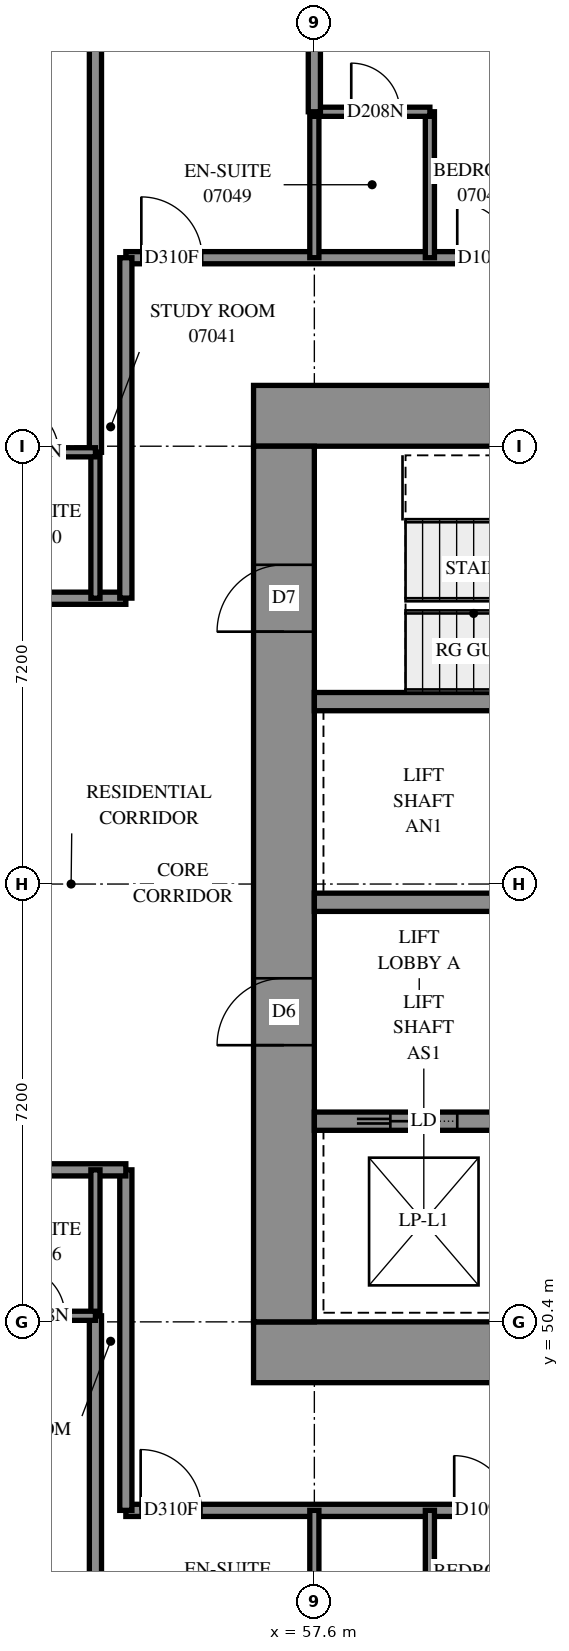
"""IFC4 building model, lengths in metres.
Left out: names, types, materials, properties, quantities, classifications, styles, units other than length and angle.
Written with IfcOpenShell. Run it as: python <this file> out.ifc"""

import sys

from ifc_helpers import new_model, si_unit, direction, frame, frame_2d, origin, place, context, subcontext, project, spatial, rectangle, extrude, element, fill, save


model = new_model("IFC4")
c1 = context("Model", 3, precision=1e-05, world=origin(), true_north=direction((0.0, 1.0)))
c2 = subcontext(c1, "Body", "Model", "MODEL_VIEW")
j1 = project(units=[si_unit("LENGTHUNIT", "METRE"), si_unit("PLANEANGLEUNIT", "RADIAN")], contexts=[c1])
p1 = place(None, origin())
s1 = spatial("IfcSite", under=j1, at=p1, CompositionType="ELEMENT")
p2 = place(p1, origin())
s2 = spatial("IfcBuilding", under=s1, at=p2, CompositionType="ELEMENT")
p3 = place(p2, frame((0.0, 0.0, 30.4)))
s3 = spatial("IfcBuildingStorey", under=s2, at=p3, CompositionType="ELEMENT", Elevation=30.4)
p4 = place(p3, frame((56.6, 49.9, -0.3), z_axis=(0.0, 0.0, 1.0), x_axis=(1.0, 0.0, 0.0)))
e1 = element("IfcWall", 1, at=p4, inside=s3, PredefinedType="SHEAR", context=c2, shape_type="SweptSolid", body=[
    extrude(rectangle(XDim=16.4, YDim=1.0, at=frame_2d((8.2, 0.0))), origin(), (0.0, 0.0, 1.0), 2.7),
])
p5 = place(p3, frame((56.6, 65.3, -0.3), z_axis=(0.0, 0.0, 1.0), x_axis=(1.0, 0.0, 0.0)))
e2 = element("IfcWall", 2, at=p5, inside=s3, PredefinedType="SHEAR", context=c2, shape_type="SweptSolid", body=[
    extrude(rectangle(XDim=16.4, YDim=1.0, at=frame_2d((8.2, 0.0))), origin(), (0.0, 0.0, 1.0), 2.7),
])
p6 = place(p5, frame((11.0, 0.0, 0.3)))
e3 = element("IfcOpeningElement", 3, at=p6, cuts=e2, PredefinedType="OPENING", context=c2, shape_type="SweptSolid", body=[
    extrude(rectangle(XDim=0.8, YDim=2.1, at=frame_2d((0.4, 1.05))), frame((0.0, 0.51, 0.0), z_axis=(0.0, -1.0, 0.0), x_axis=(1.0, 0.0, 0.0)), (0.0, 0.0, 1.0), 1.02),
])
p7 = place(p3, frame((57.1, 50.4, -0.3), z_axis=(0.0, 0.0, 1.0), x_axis=(0.0, 1.0, 0.0)))
e4 = element("IfcWall", 4, at=p7, inside=s3, PredefinedType="SHEAR", context=c2, shape_type="SweptSolid", body=[
    extrude(rectangle(XDim=14.4, YDim=1.0, at=frame_2d((7.2, 0.0))), origin(), (0.0, 0.0, 1.0), 2.7),
])
p8 = place(p7, frame((4.55, 0.0, 0.3)))
e5 = element("IfcOpeningElement", 5, at=p8, cuts=e4, PredefinedType="OPENING", context=c2, shape_type="SweptSolid", body=[
    extrude(rectangle(XDim=1.1, YDim=2.1, at=frame_2d((0.55, 1.05))), frame((0.0, 0.51, 0.0), z_axis=(0.0, -1.0, 0.0), x_axis=(1.0, 0.0, 0.0)), (0.0, 0.0, 1.0), 1.02),
])
p9 = place(p7, frame((11.35, 0.0, 0.3)))
e6 = element("IfcOpeningElement", 6, at=p9, cuts=e4, PredefinedType="OPENING", context=c2, shape_type="SweptSolid", body=[
    extrude(rectangle(XDim=1.1, YDim=2.1, at=frame_2d((0.55, 1.05))), frame((0.0, 0.51, 0.0), z_axis=(0.0, -1.0, 0.0), x_axis=(1.0, 0.0, 0.0)), (0.0, 0.0, 1.0), 1.02),
])
p10 = place(p3, frame((57.6, 53.7, 0.0), z_axis=(0.0, 0.0, 1.0), x_axis=(1.0, 0.0, 0.0)))
e7 = element("IfcWall", 7, at=p10, inside=s3, PredefinedType="SOLIDWALL", context=c2, shape_type="SweptSolid", body=[
    extrude(rectangle(XDim=14.4, YDim=0.3, at=frame_2d((7.2, 0.0))), origin(), (0.0, 0.0, 1.0), 3.1),
])
p11 = place(p10, frame((1.25, 0.0, 0.0)))
e8 = element("IfcOpeningElement", 8, at=p11, cuts=e7, PredefinedType="OPENING", context=c2, shape_type="SweptSolid", body=[
    extrude(rectangle(XDim=1.1, YDim=2.1, at=frame_2d((0.55, 1.05))), frame((0.0, 0.16, 0.0), z_axis=(0.0, -1.0, 0.0), x_axis=(1.0, 0.0, 0.0)), (0.0, 0.0, 1.0), 0.32),
])
p12 = place(p10, frame((4.85, 0.0, 0.0)))
e9 = element("IfcOpeningElement", 9, at=p12, cuts=e7, PredefinedType="OPENING", context=c2, shape_type="SweptSolid", body=[
    extrude(rectangle(XDim=1.1, YDim=2.1, at=frame_2d((0.55, 1.05))), frame((0.0, 0.16, 0.0), z_axis=(0.0, -1.0, 0.0), x_axis=(1.0, 0.0, 0.0)), (0.0, 0.0, 1.0), 0.32),
])
p13 = place(p10, frame((8.45, 0.0, 0.0)))
e10 = element("IfcOpeningElement", 10, at=p13, cuts=e7, PredefinedType="OPENING", context=c2, shape_type="SweptSolid", body=[
    extrude(rectangle(XDim=1.1, YDim=2.1, at=frame_2d((0.55, 1.05))), frame((0.0, 0.16, 0.0), z_axis=(0.0, -1.0, 0.0), x_axis=(1.0, 0.0, 0.0)), (0.0, 0.0, 1.0), 0.32),
])
p14 = place(p10, frame((12.05, 0.0, 0.0)))
e11 = element("IfcOpeningElement", 11, at=p14, cuts=e7, PredefinedType="OPENING", context=c2, shape_type="SweptSolid", body=[
    extrude(rectangle(XDim=1.1, YDim=2.1, at=frame_2d((0.55, 1.05))), frame((0.0, 0.16, 0.0), z_axis=(0.0, -1.0, 0.0), x_axis=(1.0, 0.0, 0.0)), (0.0, 0.0, 1.0), 0.32),
])
p15 = place(p3, frame((57.6, 57.3, 0.0), z_axis=(0.0, 0.0, 1.0), x_axis=(1.0, 0.0, 0.0)))
e12 = element("IfcWall", 12, at=p15, inside=s3, PredefinedType="SOLIDWALL", context=c2, shape_type="SweptSolid", body=[
    extrude(rectangle(XDim=14.4, YDim=0.3, at=frame_2d((7.2, 0.0))), origin(), (0.0, 0.0, 1.0), 3.1),
])
p16 = place(p15, frame((12.05, 0.0, 0.0)))
e13 = element("IfcOpeningElement", 13, at=p16, cuts=e12, PredefinedType="OPENING", context=c2, shape_type="SweptSolid", body=[
    extrude(rectangle(XDim=1.1, YDim=2.1, at=frame_2d((0.55, 1.05))), frame((0.0, 0.16, 0.0), z_axis=(0.0, -1.0, 0.0), x_axis=(1.0, 0.0, 0.0)), (0.0, 0.0, 1.0), 0.32),
])
p17 = place(p3, frame((57.6, 60.6, 0.0), z_axis=(0.0, 0.0, 1.0), x_axis=(1.0, 0.0, 0.0)))
e14 = element("IfcWall", 14, at=p17, inside=s3, PredefinedType="SOLIDWALL", context=c2, shape_type="SweptSolid", body=[
    extrude(rectangle(XDim=7.2, YDim=0.3, at=frame_2d((3.6, 0.0))), origin(), (0.0, 0.0, 1.0), 3.1),
])
p18 = place(p3, frame((33.502, 62.3, 0.0), z_axis=(0.0, 0.0, 1.0), x_axis=(1.0, 0.0, 0.0)))
e15 = element("IfcWall", 15, at=p18, inside=s3, PredefinedType="PARTITIONING", context=c2, shape_type="SweptSolid", body=[
    extrude(rectangle(XDim=20.998, YDim=0.2, at=frame_2d((10.499, 0.0))), origin(), (0.0, 0.0, 1.0), 3.1),
])
p19 = place(p18, frame((2.898, 0.0, 0.0)))
e16 = element("IfcOpeningElement", 16, at=p19, cuts=e15, PredefinedType="OPENING", context=c2, shape_type="SweptSolid", body=[
    extrude(rectangle(XDim=0.9, YDim=2.1, at=frame_2d((0.45, 1.05))), frame((0.0, 0.11, 0.0), z_axis=(0.0, -1.0, 0.0), x_axis=(1.0, 0.0, 0.0)), (0.0, 0.0, 1.0), 0.22),
])
p20 = place(p18, frame((8.448, 0.0, 0.0)))
e17 = element("IfcOpeningElement", 17, at=p20, cuts=e15, PredefinedType="OPENING", context=c2, shape_type="SweptSolid", body=[
    extrude(rectangle(XDim=0.9, YDim=2.1, at=frame_2d((0.45, 1.05))), frame((0.0, 0.11, 0.0), z_axis=(0.0, -1.0, 0.0), x_axis=(1.0, 0.0, 0.0)), (0.0, 0.0, 1.0), 0.22),
])
p21 = place(p18, frame((10.098, 0.0, 0.0)))
e18 = element("IfcOpeningElement", 18, at=p21, cuts=e15, PredefinedType="OPENING", context=c2, shape_type="SweptSolid", body=[
    extrude(rectangle(XDim=0.9, YDim=2.1, at=frame_2d((0.45, 1.05))), frame((0.0, 0.11, 0.0), z_axis=(0.0, -1.0, 0.0), x_axis=(1.0, 0.0, 0.0)), (0.0, 0.0, 1.0), 0.22),
])
p22 = place(p18, frame((15.648, 0.0, 0.0)))
e19 = element("IfcOpeningElement", 19, at=p22, cuts=e15, PredefinedType="OPENING", context=c2, shape_type="SweptSolid", body=[
    extrude(rectangle(XDim=0.9, YDim=2.1, at=frame_2d((0.45, 1.05))), frame((0.0, 0.11, 0.0), z_axis=(0.0, -1.0, 0.0), x_axis=(1.0, 0.0, 0.0)), (0.0, 0.0, 1.0), 0.22),
])
p23 = place(p18, frame((17.298, 0.0, 0.0)))
e20 = element("IfcOpeningElement", 20, at=p23, cuts=e15, PredefinedType="OPENING", context=c2, shape_type="SweptSolid", body=[
    extrude(rectangle(XDim=0.9, YDim=2.1, at=frame_2d((0.45, 1.05))), frame((0.0, 0.11, 0.0), z_axis=(0.0, -1.0, 0.0), x_axis=(1.0, 0.0, 0.0)), (0.0, 0.0, 1.0), 0.22),
])
p24 = place(p3, frame((54.5, 67.9, 0.0), z_axis=(0.0, 0.0, 1.0), x_axis=(1.0, 0.0, 0.0)))
e21 = element("IfcWall", 21, at=p24, inside=s3, PredefinedType="PARTITIONING", context=c2, shape_type="SweptSolid", body=[
    extrude(rectangle(XDim=20.6, YDim=0.2, at=frame_2d((10.3, 0.0))), origin(), (0.0, 0.0, 1.0), 3.1),
])
p25 = place(p24, frame((0.255, 0.0, 0.0)))
e22 = element("IfcOpeningElement", 22, at=p25, cuts=e21, PredefinedType="OPENING", context=c2, shape_type="SweptSolid", body=[
    extrude(rectangle(XDim=1.0, YDim=2.1, at=frame_2d((0.5, 1.05))), frame((0.0, 0.11, 0.0), z_axis=(0.0, -1.0, 0.0), x_axis=(1.0, 0.0, 0.0)), (0.0, 0.0, 1.0), 0.22),
])
p26 = place(p24, frame((19.345, 0.0, 0.0)))
e23 = element("IfcOpeningElement", 23, at=p26, cuts=e21, PredefinedType="OPENING", context=c2, shape_type="SweptSolid", body=[
    extrude(rectangle(XDim=1.0, YDim=2.1, at=frame_2d((0.5, 1.05))), frame((0.0, 0.11, 0.0), z_axis=(0.0, -1.0, 0.0), x_axis=(1.0, 0.0, 0.0)), (0.0, 0.0, 1.0), 0.22),
])
p27 = place(p24, frame((5.45, 0.0, 0.0)))
e24 = element("IfcOpeningElement", 24, at=p27, cuts=e21, PredefinedType="OPENING", context=c2, shape_type="SweptSolid", body=[
    extrude(rectangle(XDim=0.9, YDim=2.1, at=frame_2d((0.45, 1.05))), frame((0.0, 0.11, 0.0), z_axis=(0.0, -1.0, 0.0), x_axis=(1.0, 0.0, 0.0)), (0.0, 0.0, 1.0), 0.22),
])
p28 = place(p24, frame((7.1, 0.0, 0.0)))
e25 = element("IfcOpeningElement", 25, at=p28, cuts=e21, PredefinedType="OPENING", context=c2, shape_type="SweptSolid", body=[
    extrude(rectangle(XDim=0.9, YDim=2.1, at=frame_2d((0.45, 1.05))), frame((0.0, 0.11, 0.0), z_axis=(0.0, -1.0, 0.0), x_axis=(1.0, 0.0, 0.0)), (0.0, 0.0, 1.0), 0.22),
])
p29 = place(p24, frame((12.65, 0.0, 0.0)))
e26 = element("IfcOpeningElement", 26, at=p29, cuts=e21, PredefinedType="OPENING", context=c2, shape_type="SweptSolid", body=[
    extrude(rectangle(XDim=0.9, YDim=2.1, at=frame_2d((0.45, 1.05))), frame((0.0, 0.11, 0.0), z_axis=(0.0, -1.0, 0.0), x_axis=(1.0, 0.0, 0.0)), (0.0, 0.0, 1.0), 0.22),
])
p30 = place(p24, frame((14.3, 0.0, 0.0)))
e27 = element("IfcOpeningElement", 27, at=p30, cuts=e21, PredefinedType="OPENING", context=c2, shape_type="SweptSolid", body=[
    extrude(rectangle(XDim=0.9, YDim=2.1, at=frame_2d((0.45, 1.05))), frame((0.0, 0.11, 0.0), z_axis=(0.0, -1.0, 0.0), x_axis=(1.0, 0.0, 0.0)), (0.0, 0.0, 1.0), 0.22),
])
p31 = place(p3, frame((54.5, 47.3, 0.0), z_axis=(0.0, 0.0, 1.0), x_axis=(1.0, 0.0, 0.0)))
e28 = element("IfcWall", 28, at=p31, inside=s3, PredefinedType="PARTITIONING", context=c2, shape_type="SweptSolid", body=[
    extrude(rectangle(XDim=19.56, YDim=0.2, at=frame_2d((9.78, 0.0))), origin(), (0.0, 0.0, 1.0), 3.1),
])
p32 = place(p31, frame((0.243, 0.0, 0.0)))
e29 = element("IfcOpeningElement", 29, at=p32, cuts=e28, PredefinedType="OPENING", context=c2, shape_type="SweptSolid", body=[
    extrude(rectangle(XDim=1.0, YDim=2.1, at=frame_2d((0.5, 1.05))), frame((0.0, 0.11, 0.0), z_axis=(0.0, -1.0, 0.0), x_axis=(1.0, 0.0, 0.0)), (0.0, 0.0, 1.0), 0.22),
])
p33 = place(p31, frame((5.4, 0.0, 0.0)))
e30 = element("IfcOpeningElement", 30, at=p33, cuts=e28, PredefinedType="OPENING", context=c2, shape_type="SweptSolid", body=[
    extrude(rectangle(XDim=0.9, YDim=2.1, at=frame_2d((0.45, 1.05))), frame((0.0, 0.11, 0.0), z_axis=(0.0, -1.0, 0.0), x_axis=(1.0, 0.0, 0.0)), (0.0, 0.0, 1.0), 0.22),
])
p34 = place(p31, frame((7.1, 0.0, 0.0)))
e31 = element("IfcOpeningElement", 31, at=p34, cuts=e28, PredefinedType="OPENING", context=c2, shape_type="SweptSolid", body=[
    extrude(rectangle(XDim=0.9, YDim=2.1, at=frame_2d((0.45, 1.05))), frame((0.0, 0.11, 0.0), z_axis=(0.0, -1.0, 0.0), x_axis=(1.0, 0.0, 0.0)), (0.0, 0.0, 1.0), 0.22),
])
p35 = place(p31, frame((12.6, 0.0, 0.0)))
e32 = element("IfcOpeningElement", 32, at=p35, cuts=e28, PredefinedType="OPENING", context=c2, shape_type="SweptSolid", body=[
    extrude(rectangle(XDim=0.9, YDim=2.1, at=frame_2d((0.45, 1.05))), frame((0.0, 0.11, 0.0), z_axis=(0.0, -1.0, 0.0), x_axis=(1.0, 0.0, 0.0)), (0.0, 0.0, 1.0), 0.22),
])
p36 = place(p31, frame((14.3, 0.0, 0.0)))
e33 = element("IfcOpeningElement", 33, at=p36, cuts=e28, PredefinedType="OPENING", context=c2, shape_type="SweptSolid", body=[
    extrude(rectangle(XDim=0.9, YDim=2.1, at=frame_2d((0.45, 1.05))), frame((0.0, 0.11, 0.0), z_axis=(0.0, -1.0, 0.0), x_axis=(1.0, 0.0, 0.0)), (0.0, 0.0, 1.0), 0.22),
])
p37 = place(p3, frame((54.0, 42.42, 0.0), z_axis=(0.0, 0.0, 1.0), x_axis=(0.0, 1.0, 0.0)))
e34 = element("IfcWall", 34, at=p37, inside=s3, PredefinedType="PARTITIONING", context=c2, shape_type="SweptSolid", body=[
    extrude(rectangle(XDim=8.08, YDim=0.2, at=frame_2d((4.04, 0.0))), origin(), (0.0, 0.0, 1.0), 3.1),
])
p38 = place(p3, frame((54.0, 64.7, 0.0), z_axis=(0.0, 0.0, 1.0), x_axis=(0.0, 1.0, 0.0)))
e35 = element("IfcWall", 35, at=p38, inside=s3, PredefinedType="PARTITIONING", context=c2, shape_type="SweptSolid", body=[
    extrude(rectangle(XDim=7.986, YDim=0.2, at=frame_2d((3.993, 0.0))), origin(), (0.0, 0.0, 1.0), 3.1),
])
p39 = place(p3, frame((54.5, 47.3, 0.0), z_axis=(0.0, 0.0, 1.0), x_axis=(0.0, 1.0, 0.0)))
e36 = element("IfcWall", 36, at=p39, inside=s3, PredefinedType="PARTITIONING", context=c2, shape_type="SweptSolid", body=[
    extrude(rectangle(XDim=5.6, YDim=0.2, at=frame_2d((2.8, 0.0))), origin(), (0.0, 0.0, 1.0), 3.1),
])
p40 = place(p3, frame((54.5, 62.302, 0.0), z_axis=(0.0, 0.0, 1.0), x_axis=(0.0, 1.0, 0.0)))
e37 = element("IfcWall", 37, at=p40, inside=s3, PredefinedType="PARTITIONING", context=c2, shape_type="SweptSolid", body=[
    extrude(rectangle(XDim=5.598, YDim=0.2, at=frame_2d((2.799, 0.0))), origin(), (0.0, 0.0, 1.0), 3.1),
])
p41 = place(p3, frame((50.4, 52.9, 0.0), z_axis=(0.0, 0.0, 1.0), x_axis=(1.0, 0.0, 0.0)))
e38 = element("IfcWall", 38, at=p41, inside=s3, PredefinedType="PARTITIONING", context=c2, shape_type="SweptSolid", body=[
    extrude(rectangle(XDim=4.1, YDim=0.2, at=frame_2d((2.05, 0.0))), origin(), (0.0, 0.0, 1.0), 3.1),
])
p42 = place(p41, frame((0.4, 0.0, 0.0)))
e39 = element("IfcOpeningElement", 39, at=p42, cuts=e38, PredefinedType="OPENING", context=c2, shape_type="SweptSolid", body=[
    extrude(rectangle(XDim=0.9, YDim=2.1, at=frame_2d((0.45, 1.05))), frame((0.0, 0.11, 0.0), z_axis=(0.0, -1.0, 0.0), x_axis=(1.0, 0.0, 0.0)), (0.0, 0.0, 1.0), 0.22),
])
for number, where, z_axis, x_axis in (
    (40, (54.0, 62.3, 0.0), (0.0, 0.0, 1.0), (0.0, 1.0, 0.0)),
    (41, (54.0, 50.5, 0.0), (0.0, 0.0, 1.0), (0.0, 1.0, 0.0)),
    (42, (59.5, 44.9, 0.0), (0.0, 0.0, 1.0), (0.0, 1.0, 0.0)),
    (43, (57.6, 44.9, 0.0), (0.0, 0.0, 1.0), (0.0, 1.0, 0.0)),
    (44, (59.5, 67.9, 0.0), (0.0, 0.0, 1.0), (0.0, 1.0, 0.0)),
    (45, (57.6, 67.9, 0.0), (0.0, 0.0, 1.0), (0.0, 1.0, 0.0)),
):
    element("IfcWall", number, at=place(p3, frame(where, z_axis=z_axis, x_axis=x_axis)), inside=s3, PredefinedType="PARTITIONING", context=c2, shape_type="SweptSolid", body=[
        extrude(rectangle(XDim=2.4, YDim=0.15, at=frame_2d((1.2, 0.0))), origin(), (0.0, 0.0, 1.0), 3.1),
    ])
p43 = place(p3, frame((52.1, 64.7, 0.0), z_axis=(0.0, 0.0, 1.0), x_axis=(1.0, 0.0, 0.0)))
e46 = element("IfcWall", 46, at=p43, inside=s3, PredefinedType="PARTITIONING", context=c2, shape_type="SweptSolid", body=[
    extrude(rectangle(XDim=1.9, YDim=0.15, at=frame_2d((0.95, 0.0))), origin(), (0.0, 0.0, 1.0), 3.1),
])
p44 = place(p43, frame((0.493, 0.0, 0.0)))
e47 = element("IfcOpeningElement", 47, at=p44, cuts=e46, PredefinedType="OPENING", context=c2, shape_type="SweptSolid", body=[
    extrude(rectangle(XDim=0.8, YDim=2.1, at=frame_2d((0.4, 1.05))), frame((0.0, 0.085, 0.0), z_axis=(0.0, -1.0, 0.0), x_axis=(1.0, 0.0, 0.0)), (0.0, 0.0, 1.0), 0.17),
])
p45 = place(p3, frame((52.1, 50.5, 0.0), z_axis=(0.0, 0.0, 1.0), x_axis=(1.0, 0.0, 0.0)))
e48 = element("IfcWall", 48, at=p45, inside=s3, PredefinedType="PARTITIONING", context=c2, shape_type="SweptSolid", body=[
    extrude(rectangle(XDim=1.9, YDim=0.15, at=frame_2d((0.95, 0.0))), origin(), (0.0, 0.0, 1.0), 3.1),
])
p46 = place(p45, frame((0.598, 0.0, 0.0)))
e49 = element("IfcOpeningElement", 49, at=p46, cuts=e48, PredefinedType="OPENING", context=c2, shape_type="SweptSolid", body=[
    extrude(rectangle(XDim=0.8, YDim=2.1, at=frame_2d((0.4, 1.05))), frame((0.0, 0.085, 0.0), z_axis=(0.0, -1.0, 0.0), x_axis=(1.0, 0.0, 0.0)), (0.0, 0.0, 1.0), 0.17),
])
p47 = place(p3, frame((57.6, 70.3, 0.0), z_axis=(0.0, 0.0, 1.0), x_axis=(1.0, 0.0, 0.0)))
e50 = element("IfcWall", 50, at=p47, inside=s3, PredefinedType="PARTITIONING", context=c2, shape_type="SweptSolid", body=[
    extrude(rectangle(XDim=1.9, YDim=0.15, at=frame_2d((0.95, 0.0))), origin(), (0.0, 0.0, 1.0), 3.1),
])
p48 = place(p47, frame((0.607, 0.0, 0.0)))
e51 = element("IfcOpeningElement", 51, at=p48, cuts=e50, PredefinedType="OPENING", context=c2, shape_type="SweptSolid", body=[
    extrude(rectangle(XDim=0.8, YDim=2.1, at=frame_2d((0.4, 1.05))), frame((0.0, 0.085, 0.0), z_axis=(0.0, -1.0, 0.0), x_axis=(1.0, 0.0, 0.0)), (0.0, 0.0, 1.0), 0.17),
])
p49 = place(p3, frame((57.6, 70.3, 0.0), z_axis=(0.0, 0.0, 1.0), x_axis=(0.0, 1.0, 0.0)))
e52 = element("IfcWall", 52, at=p49, inside=s3, PredefinedType="PARTITIONING", context=c2, shape_type="SweptSolid", body=[
    extrude(rectangle(XDim=1.1, YDim=0.2, at=frame_2d((0.55, 0.0))), origin(), (0.0, 0.0, 1.0), 3.1),
])
p50 = place(p8, origin())
e53 = element("IfcDoor", 53, at=p50, inside=s3, OperationType="DOUBLE_DOOR_SINGLE_SWING", PredefinedType="DOOR", context=c2, shape_type="SweptSolid", body=[
    extrude(rectangle(XDim=1.1, YDim=2.1, at=frame_2d((0.55, 1.05))), frame((0.0, 0.025, 0.0), z_axis=(0.0, -1.0, 0.0), x_axis=(1.0, 0.0, 0.0)), (0.0, 0.0, 1.0), 0.05),
])
fill(e5, e53)
p51 = place(p9, origin())
e54 = element("IfcDoor", 54, at=p51, inside=s3, OperationType="SINGLE_SWING_LEFT", PredefinedType="DOOR", context=c2, shape_type="SweptSolid", body=[
    extrude(rectangle(XDim=1.1, YDim=2.1, at=frame_2d((0.55, 1.05))), frame((0.0, 0.025, 0.0), z_axis=(0.0, -1.0, 0.0), x_axis=(1.0, 0.0, 0.0)), (0.0, 0.0, 1.0), 0.05),
])
fill(e6, e54)
p52 = place(p11, origin())
e55 = element("IfcDoor", 55, at=p52, inside=s3, OperationType="SLIDING_TO_LEFT", PredefinedType="DOOR", context=c2, shape_type="SweptSolid", body=[
    extrude(rectangle(XDim=1.1, YDim=2.1, at=frame_2d((0.55, 1.05))), frame((0.0, 0.025, 0.0), z_axis=(0.0, -1.0, 0.0), x_axis=(1.0, 0.0, 0.0)), (0.0, 0.0, 1.0), 0.05),
])
fill(e8, e55)
p53 = place(p44, origin())
e56 = element("IfcDoor", 56, at=p53, inside=s3, OperationType="SINGLE_SWING_RIGHT", PredefinedType="DOOR", context=c2, shape_type="SweptSolid", body=[
    extrude(rectangle(XDim=0.8, YDim=2.1, at=frame_2d((0.4, 1.05))), frame((0.0, 0.025, 0.0), z_axis=(0.0, -1.0, 0.0), x_axis=(1.0, 0.0, 0.0)), (0.0, 0.0, 1.0), 0.05),
])
fill(e47, e56)
p54 = place(p25, origin())
e57 = element("IfcDoor", 57, at=p54, inside=s3, OperationType="SINGLE_SWING_LEFT", PredefinedType="DOOR", context=c2, shape_type="SweptSolid", body=[
    extrude(rectangle(XDim=1.0, YDim=2.1, at=frame_2d((0.5, 1.05))), frame((0.0, 0.025, 0.0), z_axis=(0.0, -1.0, 0.0), x_axis=(1.0, 0.0, 0.0)), (0.0, 0.0, 1.0), 0.05),
])
fill(e22, e57)
p55 = place(p46, origin())
e58 = element("IfcDoor", 58, at=p55, inside=s3, OperationType="SINGLE_SWING_RIGHT", PredefinedType="DOOR", context=c2, shape_type="SweptSolid", body=[
    extrude(rectangle(XDim=0.8, YDim=2.1, at=frame_2d((0.4, 1.05))), frame((0.0, 0.025, 0.0), z_axis=(0.0, -1.0, 0.0), x_axis=(1.0, 0.0, 0.0)), (0.0, 0.0, 1.0), 0.05),
])
fill(e49, e58)
p56 = place(p32, origin())
e59 = element("IfcDoor", 59, at=p56, inside=s3, OperationType="SINGLE_SWING_RIGHT", PredefinedType="DOOR", context=c2, shape_type="SweptSolid", body=[
    extrude(rectangle(XDim=1.0, YDim=2.1, at=frame_2d((0.5, 1.05))), frame((0.0, 0.025, 0.0), z_axis=(0.0, -1.0, 0.0), x_axis=(1.0, 0.0, 0.0)), (0.0, 0.0, 1.0), 0.05),
])
fill(e29, e59)
p57 = place(p27, origin())
e60 = element("IfcDoor", 60, at=p57, inside=s3, OperationType="SINGLE_SWING_RIGHT", PredefinedType="DOOR", context=c2, shape_type="SweptSolid", body=[
    extrude(rectangle(XDim=0.9, YDim=2.1, at=frame_2d((0.45, 1.05))), frame((0.0, 0.025, 0.0), z_axis=(0.0, -1.0, 0.0), x_axis=(1.0, 0.0, 0.0)), (0.0, 0.0, 1.0), 0.05),
])
fill(e24, e60)
p58 = place(p48, origin())
e61 = element("IfcDoor", 61, at=p58, inside=s3, OperationType="SINGLE_SWING_RIGHT", PredefinedType="DOOR", context=c2, shape_type="SweptSolid", body=[
    extrude(rectangle(XDim=0.8, YDim=2.1, at=frame_2d((0.4, 1.05))), frame((0.0, 0.025, 0.0), z_axis=(0.0, -1.0, 0.0), x_axis=(1.0, 0.0, 0.0)), (0.0, 0.0, 1.0), 0.05),
])
fill(e51, e61)
p59 = place(p33, origin())
e62 = element("IfcDoor", 62, at=p59, inside=s3, OperationType="SINGLE_SWING_LEFT", PredefinedType="DOOR", context=c2, shape_type="SweptSolid", body=[
    extrude(rectangle(XDim=0.9, YDim=2.1, at=frame_2d((0.45, 1.05))), frame((0.0, 0.025, 0.0), z_axis=(0.0, -1.0, 0.0), x_axis=(1.0, 0.0, 0.0)), (0.0, 0.0, 1.0), 0.05),
])
fill(e30, e62)
save(model, sys.argv[1])
